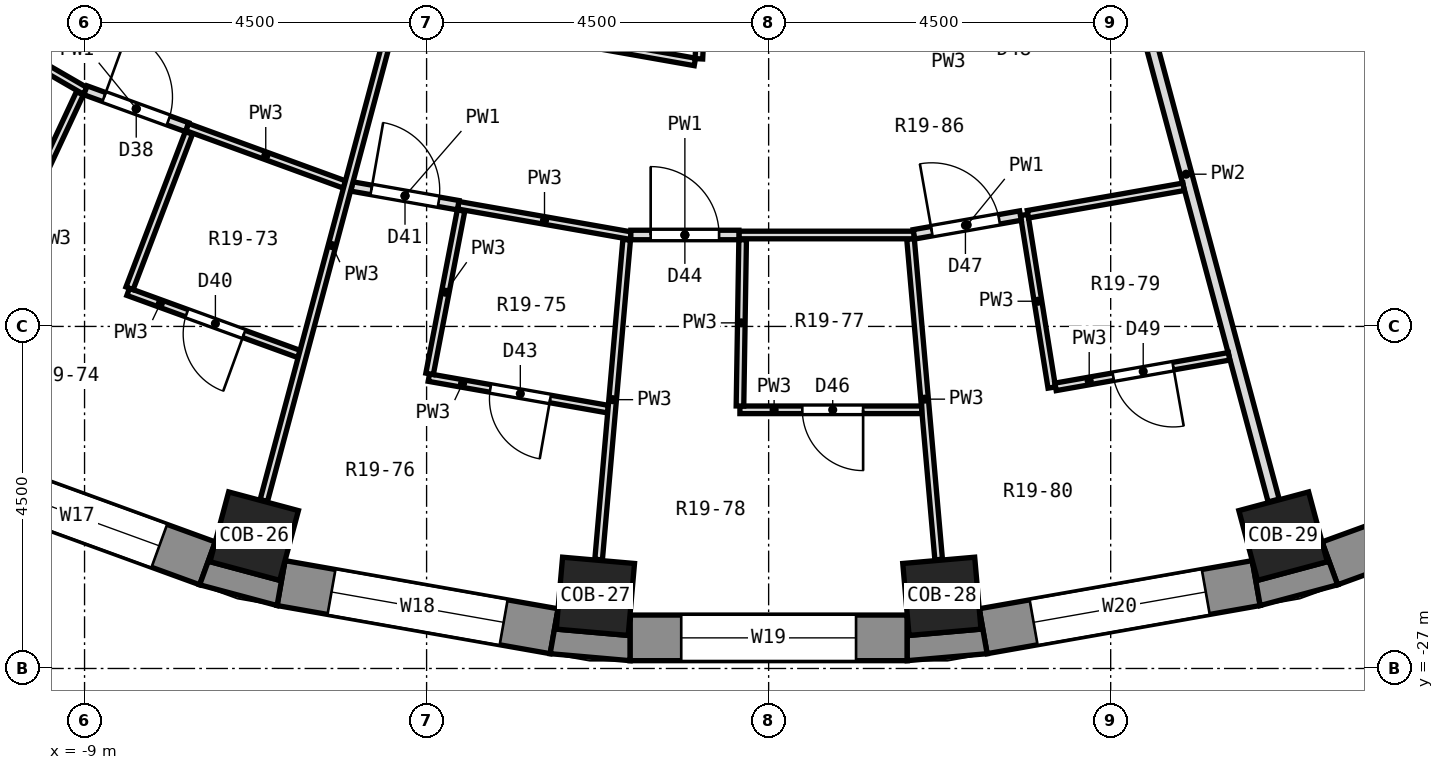
"""IFC4 building model, lengths in metres.
Left out: names, types, materials, properties, quantities, classifications, styles, units other than length and angle.
Written with IfcOpenShell. Run it as: python <this file> out.ifc"""

import sys

from ifc_helpers import new_model, si_unit, direction, frame, frame_2d, origin, origin_2d, place, context, subcontext, project, spatial, polyline, rectangle, outline, extrude, element, fill, save


model = new_model("IFC4")
c1 = context("Model", 3, precision=1e-05, world=origin(), true_north=direction((0.0, 1.0)))
c2 = subcontext(c1, "Body", "Model", "MODEL_VIEW")
j1 = project(units=[si_unit("LENGTHUNIT", "METRE"), si_unit("PLANEANGLEUNIT", "RADIAN")], contexts=[c1])
p1 = place(None, origin())
s1 = spatial("IfcSite", under=j1, at=p1, CompositionType="ELEMENT")
p2 = place(p1, origin())
s2 = spatial("IfcBuilding", under=s1, at=p2, CompositionType="ELEMENT")
p3 = place(p2, frame((0.0, 0.0, 111.7)))
s3 = spatial("IfcBuildingStorey", under=s2, at=p3, CompositionType="ELEMENT", Elevation=111.7)
for number, where, z_axis, x_axis in (
    (1, (-6.768, -25.259, 0.0), (0.0, 0.0, 1.0), (-0.259, -0.966, 0.0)),
    (2, (-2.279, -26.051, 0.0), (0.0, 0.0, 1.0), (-0.087, -0.996, 0.0)),
    (3, (2.279, -26.051, 0.0), (0.0, 0.0, 1.0), (0.087, -0.996, 0.0)),
    (4, (6.768, -25.259, 0.0), (0.0, 0.0, 1.0), (0.259, -0.966, 0.0)),
):
    element("IfcColumn", number, at=place(p3, frame(where, z_axis=z_axis, x_axis=x_axis)), inside=s3, PredefinedType="COLUMN", context=c2, shape_type="SweptSolid", body=[
        extrude(rectangle(XDim=0.95, YDim=0.95, at=origin_2d()), origin(), (0.0, 0.0, 1.0), 3.3),
    ])
p4 = place(p3, frame((-10.811, -24.369, 0.0), z_axis=(0.0, 0.0, 1.0), x_axis=(0.939703505393, -0.341990236633, 0.0)))
e5 = element("IfcWall", 5, at=p4, inside=s3, PredefinedType="SOLIDWALL", context=c2, shape_type="SweptSolid", body=[
    extrude(rectangle(XDim=3.648, YDim=0.6, at=frame_2d((1.824, 0.0))), origin(), (0.0, 0.0, 1.0), 2.8),
])
p5 = place(p4, frame((0.674, 0.0, 0.9)))
e6 = element("IfcOpeningElement", 6, at=p5, cuts=e5, PredefinedType="OPENING", context=c2, shape_type="SweptSolid", body=[
    extrude(rectangle(XDim=2.3, YDim=1.8, at=frame_2d((1.15, 0.9))), frame((0.0, 0.312, 0.0), z_axis=(0.0, -1.0, 0.0), x_axis=(1.0, 0.0, 0.0)), (0.0, 0.0, 1.0), 0.624),
])
p6 = place(p3, frame((-6.415, -25.876, 0.0), z_axis=(0.0, 0.0, 1.0), x_axis=(0.984803764455, -0.173670796382, 0.0)))
e7 = element("IfcWall", 7, at=p6, inside=s3, PredefinedType="SOLIDWALL", context=c2, shape_type="SweptSolid", body=[
    extrude(rectangle(XDim=3.648, YDim=0.6, at=frame_2d((1.824, 0.0))), origin(), (0.0, 0.0, 1.0), 2.8),
])
p7 = place(p6, frame((0.674, 0.0, 0.9)))
e8 = element("IfcOpeningElement", 8, at=p7, cuts=e7, PredefinedType="OPENING", context=c2, shape_type="SweptSolid", body=[
    extrude(rectangle(XDim=2.3, YDim=1.8, at=frame_2d((1.15, 0.9))), frame((0.0, 0.312, 0.0), z_axis=(0.0, -1.0, 0.0), x_axis=(1.0, 0.0, 0.0)), (0.0, 0.0, 1.0), 0.624),
])
p8 = place(p3, frame((-1.824, -26.597, 0.0), z_axis=(0.0, 0.0, 1.0), x_axis=(1.0, 0.0, 0.0)))
e9 = element("IfcWall", 9, at=p8, inside=s3, PredefinedType="SOLIDWALL", context=c2, shape_type="SweptSolid", body=[
    extrude(rectangle(XDim=3.648, YDim=0.6, at=frame_2d((1.824, 0.0))), origin(), (0.0, 0.0, 1.0), 2.8),
])
p9 = place(p8, frame((0.674, 0.0, 0.9)))
e10 = element("IfcOpeningElement", 10, at=p9, cuts=e9, PredefinedType="OPENING", context=c2, shape_type="SweptSolid", body=[
    extrude(rectangle(XDim=2.3, YDim=1.8, at=frame_2d((1.15, 0.9))), frame((0.0, 0.312, 0.0), z_axis=(0.0, -1.0, 0.0), x_axis=(1.0, 0.0, 0.0)), (0.0, 0.0, 1.0), 0.624),
])
p10 = place(p3, frame((2.822, -26.51, 0.0), z_axis=(0.0, 0.0, 1.0), x_axis=(0.984803764455, 0.173670796382, 0.0)))
e11 = element("IfcWall", 11, at=p10, inside=s3, PredefinedType="SOLIDWALL", context=c2, shape_type="SweptSolid", body=[
    extrude(rectangle(XDim=3.648, YDim=0.6, at=frame_2d((1.824, 0.0))), origin(), (0.0, 0.0, 1.0), 2.8),
])
p11 = place(p10, frame((0.674, 0.0, 0.9)))
e12 = element("IfcOpeningElement", 12, at=p11, cuts=e11, PredefinedType="OPENING", context=c2, shape_type="SweptSolid", body=[
    extrude(rectangle(XDim=2.3, YDim=1.8, at=frame_2d((1.15, 0.9))), frame((0.0, 0.312, 0.0), z_axis=(0.0, -1.0, 0.0), x_axis=(1.0, 0.0, 0.0)), (0.0, 0.0, 1.0), 0.624),
])
p12 = place(p3, frame((7.383, -25.617, 0.0), z_axis=(0.0, 0.0, 1.0), x_axis=(0.939703505393, 0.341990236633, 0.0)))
e13 = element("IfcWall", 13, at=p12, inside=s3, PredefinedType="SOLIDWALL", context=c2, shape_type="SweptSolid", body=[
    extrude(rectangle(XDim=3.648, YDim=0.6, at=frame_2d((1.824, 0.0))), origin(), (0.0, 0.0, 1.0), 2.8),
])
p13 = place(p12, frame((0.674, 0.0, 0.9)))
e14 = element("IfcOpeningElement", 14, at=p13, cuts=e13, PredefinedType="OPENING", context=c2, shape_type="SweptSolid", body=[
    extrude(rectangle(XDim=2.3, YDim=1.8, at=frame_2d((1.15, 0.9))), frame((0.0, 0.312, 0.0), z_axis=(0.0, -1.0, 0.0), x_axis=(1.0, 0.0, 0.0)), (0.0, 0.0, 1.0), 0.624),
])
p14 = place(p3, origin())
e15 = element("IfcWall", 15, at=p14, inside=s3, PredefinedType="SOLIDWALL", context=c2, shape_type="SweptSolid", body=[
    extrude(outline(polyline([(-7.486, -25.899), (-6.467, -26.172), (-6.363, -25.581), (-6.432, -25.841), (-7.35, -25.595), (-7.28, -25.335), (-7.486, -25.899)])), origin(), (0.0, 0.0, 1.0), 2.8),
])
p15 = place(p3, origin())
e16 = element("IfcWall", 16, at=p15, inside=s3, PredefinedType="SOLIDWALL", context=c2, shape_type="SweptSolid", body=[
    extrude(outline(polyline([(-2.875, -26.805), (-1.824, -26.897), (-1.824, -26.297), (-1.847, -26.565), (-2.794, -26.482), (-2.77, -26.215), (-2.875, -26.805)])), origin(), (0.0, 0.0, 1.0), 2.8),
])
p16 = place(p3, origin())
e17 = element("IfcWall", 17, at=p16, inside=s3, PredefinedType="SOLIDWALL", context=c2, shape_type="SweptSolid", body=[
    extrude(outline(polyline([(2.875, -26.805), (2.77, -26.215), (2.794, -26.482), (1.847, -26.565), (1.824, -26.297), (1.824, -26.897), (2.875, -26.805)])), origin(), (0.0, 0.0, 1.0), 2.8),
])
p17 = place(p3, origin())
e18 = element("IfcWall", 18, at=p17, inside=s3, PredefinedType="SOLIDWALL", context=c2, shape_type="SweptSolid", body=[
    extrude(outline(polyline([(6.467, -26.172), (7.486, -25.899), (7.28, -25.335), (7.35, -25.595), (6.432, -25.841), (6.363, -25.581), (6.467, -26.172)])), origin(), (0.0, 0.0, 1.0), 2.8),
])
p18 = place(p3, frame((1.866, -21.347, 0.0), z_axis=(0.0, 0.0, 1.0), x_axis=(0.087475042973, -0.996166711378, 0.0)))
e19 = element("IfcWall", 19, at=p18, inside=s3, PredefinedType="PARTITIONING", context=c2, shape_type="SweptSolid", body=[
    extrude(rectangle(XDim=4.237, YDim=0.1, at=frame_2d((2.118, 0.0))), origin(), (0.0, 0.0, 1.0), 2.8),
])
p19 = place(p3, frame((3.362, -21.033, 0.0), z_axis=(0.0, 0.0, 1.0), x_axis=(0.157853871444, -0.987462482968, 0.0)))
e20 = element("IfcWall", 20, at=p19, inside=s3, PredefinedType="PARTITIONING", context=c2, shape_type="SweptSolid", body=[
    extrude(rectangle(XDim=2.3, YDim=0.1, at=frame_2d((1.15, 0.0))), origin(), (0.0, 0.0, 1.0), 2.8),
])
p20 = place(p3, frame((4.34, -16.204, 0.0), z_axis=(0.0, 0.0, 1.0), x_axis=(0.259146062247, -0.965838142973, 0.0)))
e21 = element("IfcWall", 21, at=p20, inside=s3, PredefinedType="PARTITIONING", context=c2, shape_type="SweptSolid", body=[
    extrude(rectangle(XDim=8.89, YDim=0.15, at=frame_2d((4.445, 0.0))), origin(), (0.0, 0.0, 1.0), 2.8),
])
p21 = place(p3, frame((-10.987, -18.248, 0.0), z_axis=(0.0, 0.0, 1.0), x_axis=(0.865887497708, -0.500238784294, 0.0)))
e22 = element("IfcWall", 22, at=p21, inside=s3, PredefinedType="PARTITIONING", context=c2, shape_type="SweptSolid", body=[
    extrude(rectangle(XDim=2.305, YDim=0.1, at=frame_2d((1.153, 0.0))), origin(), (0.0, 0.0, 1.0), 2.8),
])
p22 = place(p3, frame((-7.651, -19.877, 0.0), z_axis=(0.0, 0.0, 1.0), x_axis=(0.939404870565, -0.342809698169, 0.0)))
e23 = element("IfcWall", 23, at=p22, inside=s3, PredefinedType="PARTITIONING", context=c2, shape_type="SweptSolid", body=[
    extrude(rectangle(XDim=2.205, YDim=0.1, at=frame_2d((1.103, 0.0))), origin(), (0.0, 0.0, 1.0), 2.8),
])
p23 = place(p3, frame((-8.426, -22.045, 0.0), z_axis=(0.0, 0.0, 1.0), x_axis=(0.93973977618, -0.341890557146, 0.0)))
e24 = element("IfcWall", 24, at=p23, inside=s3, PredefinedType="PARTITIONING", context=c2, shape_type="SweptSolid", body=[
    extrude(rectangle(XDim=2.392, YDim=0.1, at=frame_2d((1.196, 0.0))), origin(), (0.0, 0.0, 1.0), 2.8),
])
p24 = place(p23, frame((0.821, 0.0, 0.0)))
e25 = element("IfcOpeningElement", 25, at=p24, cuts=e24, PredefinedType="OPENING", context=c2, shape_type="SweptSolid", body=[
    extrude(rectangle(XDim=0.8, YDim=2.1, at=frame_2d((0.4, 1.05))), frame((0.0, 0.062, 0.0), z_axis=(0.0, -1.0, 0.0), x_axis=(1.0, 0.0, 0.0)), (0.0, 0.0, 1.0), 0.124),
])
p25 = place(p3, frame((-8.988, -19.393, 0.0), z_axis=(0.0, 0.0, 1.0), x_axis=(0.939783394235, -0.341770642275, 0.0)))
e26 = element("IfcWall", 26, at=p25, inside=s3, PredefinedType="PARTITIONING", context=c2, shape_type="SweptSolid", body=[
    extrude(rectangle(XDim=1.422, YDim=0.125, at=frame_2d((0.711, 0.0))), origin(), (0.0, 0.0, 1.0), 2.8),
])
p26 = place(p25, frame((0.261, 0.0, 0.0)))
e27 = element("IfcOpeningElement", 27, at=p26, cuts=e26, PredefinedType="OPENING", context=c2, shape_type="SweptSolid", body=[
    extrude(rectangle(XDim=0.9, YDim=2.1, at=frame_2d((0.45, 1.05))), frame((0.0, 0.074, 0.0), z_axis=(0.0, -1.0, 0.0), x_axis=(1.0, 0.0, 0.0)), (0.0, 0.0, 1.0), 0.149),
])
p27 = place(p3, frame((-4.47, -23.173, 0.0), z_axis=(0.0, 0.0, 1.0), x_axis=(0.984826665662, -0.173540884522, 0.0)))
e28 = element("IfcWall", 28, at=p27, inside=s3, PredefinedType="PARTITIONING", context=c2, shape_type="SweptSolid", body=[
    extrude(rectangle(XDim=2.393, YDim=0.1, at=frame_2d((1.197, 0.0))), origin(), (0.0, 0.0, 1.0), 2.8),
])
p28 = place(p27, frame((0.822, 0.0, 0.0)))
e29 = element("IfcOpeningElement", 29, at=p28, cuts=e28, PredefinedType="OPENING", context=c2, shape_type="SweptSolid", body=[
    extrude(rectangle(XDim=0.8, YDim=2.1, at=frame_2d((0.4, 1.05))), frame((0.0, 0.062, 0.0), z_axis=(0.0, -1.0, 0.0), x_axis=(1.0, 0.0, 0.0)), (0.0, 0.0, 1.0), 0.124),
])
p29 = place(p3, frame((-4.084, -20.905, 0.0), z_axis=(0.0, 0.0, 1.0), x_axis=(0.984796344358, -0.173712866935, 0.0)))
e30 = element("IfcWall", 30, at=p29, inside=s3, PredefinedType="PARTITIONING", context=c2, shape_type="SweptSolid", body=[
    extrude(rectangle(XDim=2.306, YDim=0.1, at=frame_2d((1.153, 0.0))), origin(), (0.0, 0.0, 1.0), 2.8),
])
p30 = place(p3, frame((-5.484, -20.659, 0.0), z_axis=(0.0, 0.0, 1.0), x_axis=(0.984828496868, -0.173530492295, 0.0)))
e31 = element("IfcWall", 31, at=p30, inside=s3, PredefinedType="PARTITIONING", context=c2, shape_type="SweptSolid", body=[
    extrude(rectangle(XDim=1.421, YDim=0.125, at=frame_2d((0.71, 0.0))), origin(), (0.0, 0.0, 1.0), 2.8),
])
p31 = place(p30, frame((0.26, 0.0, 0.0)))
e32 = element("IfcOpeningElement", 32, at=p31, cuts=e31, PredefinedType="OPENING", context=c2, shape_type="SweptSolid", body=[
    extrude(rectangle(XDim=0.9, YDim=2.1, at=frame_2d((0.45, 1.05))), frame((0.0, 0.074, 0.0), z_axis=(0.0, -1.0, 0.0), x_axis=(1.0, 0.0, 0.0)), (0.0, 0.0, 1.0), 0.149),
])
p32 = place(p3, frame((-3.119, -18.641, 0.0), z_axis=(0.0, 0.0, 1.0), x_axis=(0.984804954455, -0.173664048326, 0.0)))
e33 = element("IfcWall", 33, at=p32, inside=s3, PredefinedType="PARTITIONING", context=c2, shape_type="SweptSolid", body=[
    extrude(rectangle(XDim=2.182, YDim=0.1, at=frame_2d((1.091, 0.0))), origin(), (0.0, 0.0, 1.0), 2.8),
])
p33 = place(p3, frame((-0.378, -23.597, 0.0), z_axis=(0.0, 0.0, 1.0), x_axis=(1.0, 0.0, 0.0)))
e34 = element("IfcWall", 34, at=p33, inside=s3, PredefinedType="PARTITIONING", context=c2, shape_type="SweptSolid", body=[
    extrude(rectangle(XDim=2.392, YDim=0.1, at=frame_2d((1.196, 0.0))), origin(), (0.0, 0.0, 1.0), 2.8),
])
p34 = place(p33, frame((0.821, 0.0, 0.0)))
e35 = element("IfcOpeningElement", 35, at=p34, cuts=e34, PredefinedType="OPENING", context=c2, shape_type="SweptSolid", body=[
    extrude(rectangle(XDim=0.8, YDim=2.1, at=frame_2d((0.4, 1.05))), frame((0.0, 0.062, 0.0), z_axis=(0.0, -1.0, 0.0), x_axis=(1.0, 0.0, 0.0)), (0.0, 0.0, 1.0), 0.124),
])
p35 = place(p3, frame((-0.391, -21.297, 0.0), z_axis=(0.0, 0.0, 1.0), x_axis=(1.0, 0.0, 0.0)))
e36 = element("IfcWall", 36, at=p35, inside=s3, PredefinedType="PARTITIONING", context=c2, shape_type="SweptSolid", body=[
    extrude(rectangle(XDim=2.305, YDim=0.1, at=frame_2d((1.152, 0.0))), origin(), (0.0, 0.0, 1.0), 2.8),
])
p36 = place(p3, frame((-1.813, -21.297, 0.0), z_axis=(0.0, 0.0, 1.0), x_axis=(1.0, 0.0, 0.0)))
e37 = element("IfcWall", 37, at=p36, inside=s3, PredefinedType="PARTITIONING", context=c2, shape_type="SweptSolid", body=[
    extrude(rectangle(XDim=1.422, YDim=0.125, at=frame_2d((0.711, 0.0))), origin(), (0.0, 0.0, 1.0), 2.8),
])
p37 = place(p36, frame((0.261, 0.0, 0.0)))
e38 = element("IfcOpeningElement", 38, at=p37, cuts=e37, PredefinedType="OPENING", context=c2, shape_type="SweptSolid", body=[
    extrude(rectangle(XDim=0.9, YDim=2.1, at=frame_2d((0.45, 1.05))), frame((0.0, 0.074, 0.0), z_axis=(0.0, -1.0, 0.0), x_axis=(1.0, 0.0, 0.0)), (0.0, 0.0, 1.0), 0.149),
])
p38 = place(p3, frame((3.774, -23.295, 0.0), z_axis=(0.0, 0.0, 1.0), x_axis=(0.984822762683, 0.173563032072, 0.0)))
e39 = element("IfcWall", 39, at=p38, inside=s3, PredefinedType="PARTITIONING", context=c2, shape_type="SweptSolid", body=[
    extrude(rectangle(XDim=2.318, YDim=0.1, at=frame_2d((1.159, 0.0))), origin(), (0.0, 0.0, 1.0), 2.8),
])
p39 = place(p38, frame((0.771, 0.0, 0.0)))
e40 = element("IfcOpeningElement", 40, at=p39, cuts=e39, PredefinedType="OPENING", context=c2, shape_type="SweptSolid", body=[
    extrude(rectangle(XDim=0.8, YDim=2.1, at=frame_2d((0.4, 1.05))), frame((0.0, 0.062, 0.0), z_axis=(0.0, -1.0, 0.0), x_axis=(1.0, 0.0, 0.0)), (0.0, 0.0, 1.0), 0.124),
])
p40 = place(p3, frame((3.411, -21.024, 0.0), z_axis=(0.0, 0.0, 1.0), x_axis=(0.984791830212, 0.173738456158, 0.0)))
e41 = element("IfcWall", 41, at=p40, inside=s3, PredefinedType="PARTITIONING", context=c2, shape_type="SweptSolid", body=[
    extrude(rectangle(XDim=2.08, YDim=0.1, at=frame_2d((1.04, 0.0))), origin(), (0.0, 0.0, 1.0), 2.8),
])
p41 = place(p3, frame((1.912, -21.288, 0.0), z_axis=(0.0, 0.0, 1.0), x_axis=(0.984849170905, 0.173413121097, 0.0)))
e42 = element("IfcWall", 42, at=p41, inside=s3, PredefinedType="PARTITIONING", context=c2, shape_type="SweptSolid", body=[
    extrude(rectangle(XDim=1.422, YDim=0.125, at=frame_2d((0.711, 0.0))), origin(), (0.0, 0.0, 1.0), 2.8),
])
p42 = place(p41, frame((0.237, 0.0, 0.0)))
e43 = element("IfcOpeningElement", 43, at=p42, cuts=e42, PredefinedType="OPENING", context=c2, shape_type="SweptSolid", body=[
    extrude(rectangle(XDim=0.9, YDim=2.1, at=frame_2d((0.45, 1.05))), frame((0.0, 0.074, 0.0), z_axis=(0.0, -1.0, 0.0), x_axis=(1.0, 0.0, 0.0)), (0.0, 0.0, 1.0), 0.149),
])
p43 = place(p3, frame((-10.847, -23.26, 0.0), z_axis=(0.0, 0.0, 1.0), x_axis=(0.422841161976, 0.906203813575, 0.0)))
e44 = element("IfcWall", 44, at=p43, inside=s3, PredefinedType="PARTITIONING", context=c2, shape_type="SweptSolid", body=[
    extrude(rectangle(XDim=4.224, YDim=0.1, at=frame_2d((2.112, 0.0))), origin(), (0.0, 0.0, 1.0), 2.8),
])
p44 = place(p3, frame((-8.408, -21.998, 0.0), z_axis=(0.0, 0.0, 1.0), x_axis=(0.356937039246, 0.934128444067, 0.0)))
e45 = element("IfcWall", 45, at=p44, inside=s3, PredefinedType="PARTITIONING", context=c2, shape_type="SweptSolid", body=[
    extrude(rectangle(XDim=2.188, YDim=0.1, at=frame_2d((1.094, 0.0))), origin(), (0.0, 0.0, 1.0), 2.8),
])
p45 = place(p3, frame((-6.642, -24.791, 0.0), z_axis=(0.0, 0.0, 1.0), x_axis=(0.258515851323, 0.966007015821, 0.0)))
e46 = element("IfcWall", 46, at=p45, inside=s3, PredefinedType="PARTITIONING", context=c2, shape_type="SweptSolid", body=[
    extrude(rectangle(XDim=6.945, YDim=0.1, at=frame_2d((3.473, 0.0))), origin(), (0.0, 0.0, 1.0), 2.8),
])
p46 = place(p3, frame((-4.46, -23.124, 0.0), z_axis=(0.0, 0.0, 1.0), x_axis=(0.189008785522, 0.981975396329, 0.0)))
e47 = element("IfcWall", 47, at=p46, inside=s3, PredefinedType="PARTITIONING", context=c2, shape_type="SweptSolid", body=[
    extrude(rectangle(XDim=2.188, YDim=0.1, at=frame_2d((1.094, 0.0))), origin(), (0.0, 0.0, 1.0), 2.8),
])
p47 = place(p3, frame((-2.237, -25.567, 0.0), z_axis=(0.0, 0.0, 1.0), x_axis=(0.087445126958, 0.9961693379, 0.0)))
e48 = element("IfcWall", 48, at=p47, inside=s3, PredefinedType="PARTITIONING", context=c2, shape_type="SweptSolid", body=[
    extrude(rectangle(XDim=4.224, YDim=0.1, at=frame_2d((2.112, 0.0))), origin(), (0.0, 0.0, 1.0), 2.8),
])
p48 = place(p3, frame((-0.918, -18.979, 0.0), z_axis=(0.0, 0.0, 1.0), x_axis=(0.049018559161, 0.998797867868, 0.0)))
e49 = element("IfcWall", 49, at=p48, inside=s3, PredefinedType="PARTITIONING", context=c2, shape_type="SweptSolid", body=[
    extrude(rectangle(XDim=2.729, YDim=0.1, at=frame_2d((1.365, 0.0))), origin(), (0.0, 0.0, 1.0), 2.8),
])
p49 = place(p48, frame((1.179, 0.0, 0.0)))
e50 = element("IfcOpeningElement", 50, at=p49, cuts=e49, PredefinedType="OPENING", context=c2, shape_type="SweptSolid", body=[
    extrude(rectangle(XDim=0.8, YDim=2.1, at=frame_2d((0.4, 1.05))), frame((0.0, 0.062, 0.0), z_axis=(0.0, -1.0, 0.0), x_axis=(1.0, 0.0, 0.0)), (0.0, 0.0, 1.0), 0.124),
])
p50 = place(p3, frame((-0.377, -23.547, 0.0), z_axis=(0.0, 0.0, 1.0), x_axis=(0.016067560631, 0.999870908415, 0.0)))
e51 = element("IfcWall", 51, at=p50, inside=s3, PredefinedType="PARTITIONING", context=c2, shape_type="SweptSolid", body=[
    extrude(rectangle(XDim=2.188, YDim=0.1, at=frame_2d((1.094, 0.0))), origin(), (0.0, 0.0, 1.0), 2.8),
])
p51 = place(p5, origin())
e52 = element("IfcWindow", 52, at=p51, inside=s3, PartitioningType="SINGLE_PANEL", PredefinedType="WINDOW", context=c2, shape_type="SweptSolid", body=[
    extrude(rectangle(XDim=2.3, YDim=1.8, at=frame_2d((1.15, 0.9))), frame((0.0, 0.18, 0.0), z_axis=(0.0, -1.0, 0.0), x_axis=(1.0, 0.0, 0.0)), (0.0, 0.0, 1.0), 0.06),
])
fill(e6, e52)
p52 = place(p7, origin())
e53 = element("IfcWindow", 53, at=p52, inside=s3, PartitioningType="SINGLE_PANEL", PredefinedType="WINDOW", context=c2, shape_type="SweptSolid", body=[
    extrude(rectangle(XDim=2.3, YDim=1.8, at=frame_2d((1.15, 0.9))), frame((0.0, 0.18, 0.0), z_axis=(0.0, -1.0, 0.0), x_axis=(1.0, 0.0, 0.0)), (0.0, 0.0, 1.0), 0.06),
])
fill(e8, e53)
p53 = place(p9, origin())
e54 = element("IfcWindow", 54, at=p53, inside=s3, PartitioningType="SINGLE_PANEL", PredefinedType="WINDOW", context=c2, shape_type="SweptSolid", body=[
    extrude(rectangle(XDim=2.3, YDim=1.8, at=frame_2d((1.15, 0.9))), frame((0.0, 0.18, 0.0), z_axis=(0.0, -1.0, 0.0), x_axis=(1.0, 0.0, 0.0)), (0.0, 0.0, 1.0), 0.06),
])
fill(e10, e54)
p54 = place(p11, origin())
e55 = element("IfcWindow", 55, at=p54, inside=s3, PartitioningType="SINGLE_PANEL", PredefinedType="WINDOW", context=c2, shape_type="SweptSolid", body=[
    extrude(rectangle(XDim=2.3, YDim=1.8, at=frame_2d((1.15, 0.9))), frame((0.0, 0.18, 0.0), z_axis=(0.0, -1.0, 0.0), x_axis=(1.0, 0.0, 0.0)), (0.0, 0.0, 1.0), 0.06),
])
fill(e12, e55)
p55 = place(p26, origin())
e56 = element("IfcDoor", 56, at=p55, inside=s3, OperationType="SINGLE_SWING_LEFT", PredefinedType="DOOR", context=c2, shape_type="SweptSolid", body=[
    extrude(rectangle(XDim=0.9, YDim=2.1, at=frame_2d((0.45, 1.05))), frame((0.0, 0.025, 0.0), z_axis=(0.0, -1.0, 0.0), x_axis=(1.0, 0.0, 0.0)), (0.0, 0.0, 1.0), 0.05),
])
fill(e27, e56)
p56 = place(p24, frame((0.8, 0.0, 0.0), z_axis=(0.0, 0.0, 1.0), x_axis=(-1.0, 0.0, 0.0)))
e57 = element("IfcDoor", 57, at=p56, inside=s3, OperationType="SINGLE_SWING_LEFT", PredefinedType="DOOR", context=c2, shape_type="SweptSolid", body=[
    extrude(rectangle(XDim=0.8, YDim=2.1, at=frame_2d((0.4, 1.05))), frame((0.0, 0.025, 0.0), z_axis=(0.0, -1.0, 0.0), x_axis=(1.0, 0.0, 0.0)), (0.0, 0.0, 1.0), 0.05),
])
fill(e25, e57)
p57 = place(p31, origin())
e58 = element("IfcDoor", 58, at=p57, inside=s3, OperationType="SINGLE_SWING_LEFT", PredefinedType="DOOR", context=c2, shape_type="SweptSolid", body=[
    extrude(rectangle(XDim=0.9, YDim=2.1, at=frame_2d((0.45, 1.05))), frame((0.0, 0.025, 0.0), z_axis=(0.0, -1.0, 0.0), x_axis=(1.0, 0.0, 0.0)), (0.0, 0.0, 1.0), 0.05),
])
fill(e32, e58)
p58 = place(p28, frame((0.8, 0.0, 0.0), z_axis=(0.0, 0.0, 1.0), x_axis=(-1.0, 0.0, 0.0)))
e59 = element("IfcDoor", 59, at=p58, inside=s3, OperationType="SINGLE_SWING_LEFT", PredefinedType="DOOR", context=c2, shape_type="SweptSolid", body=[
    extrude(rectangle(XDim=0.8, YDim=2.1, at=frame_2d((0.4, 1.05))), frame((0.0, 0.025, 0.0), z_axis=(0.0, -1.0, 0.0), x_axis=(1.0, 0.0, 0.0)), (0.0, 0.0, 1.0), 0.05),
])
fill(e29, e59)
p59 = place(p37, origin())
e60 = element("IfcDoor", 60, at=p59, inside=s3, OperationType="SINGLE_SWING_LEFT", PredefinedType="DOOR", context=c2, shape_type="SweptSolid", body=[
    extrude(rectangle(XDim=0.9, YDim=2.1, at=frame_2d((0.45, 1.05))), frame((0.0, 0.025, 0.0), z_axis=(0.0, -1.0, 0.0), x_axis=(1.0, 0.0, 0.0)), (0.0, 0.0, 1.0), 0.05),
])
fill(e38, e60)
p60 = place(p34, frame((0.8, 0.0, 0.0), z_axis=(0.0, 0.0, 1.0), x_axis=(-1.0, 0.0, 0.0)))
e61 = element("IfcDoor", 61, at=p60, inside=s3, OperationType="SINGLE_SWING_LEFT", PredefinedType="DOOR", context=c2, shape_type="SweptSolid", body=[
    extrude(rectangle(XDim=0.8, YDim=2.1, at=frame_2d((0.4, 1.05))), frame((0.0, 0.025, 0.0), z_axis=(0.0, -1.0, 0.0), x_axis=(1.0, 0.0, 0.0)), (0.0, 0.0, 1.0), 0.05),
])
fill(e35, e61)
p61 = place(p42, origin())
e62 = element("IfcDoor", 62, at=p61, inside=s3, OperationType="SINGLE_SWING_LEFT", PredefinedType="DOOR", context=c2, shape_type="SweptSolid", body=[
    extrude(rectangle(XDim=0.9, YDim=2.1, at=frame_2d((0.45, 1.05))), frame((0.0, 0.025, 0.0), z_axis=(0.0, -1.0, 0.0), x_axis=(1.0, 0.0, 0.0)), (0.0, 0.0, 1.0), 0.05),
])
fill(e43, e62)
p62 = place(p39, frame((0.8, 0.0, 0.0), z_axis=(0.0, 0.0, 1.0), x_axis=(-1.0, 0.0, 0.0)))
e63 = element("IfcDoor", 63, at=p62, inside=s3, OperationType="SINGLE_SWING_LEFT", PredefinedType="DOOR", context=c2, shape_type="SweptSolid", body=[
    extrude(rectangle(XDim=0.8, YDim=2.1, at=frame_2d((0.4, 1.05))), frame((0.0, 0.025, 0.0), z_axis=(0.0, -1.0, 0.0), x_axis=(1.0, 0.0, 0.0)), (0.0, 0.0, 1.0), 0.05),
])
fill(e40, e63)
save(model, sys.argv[1])
